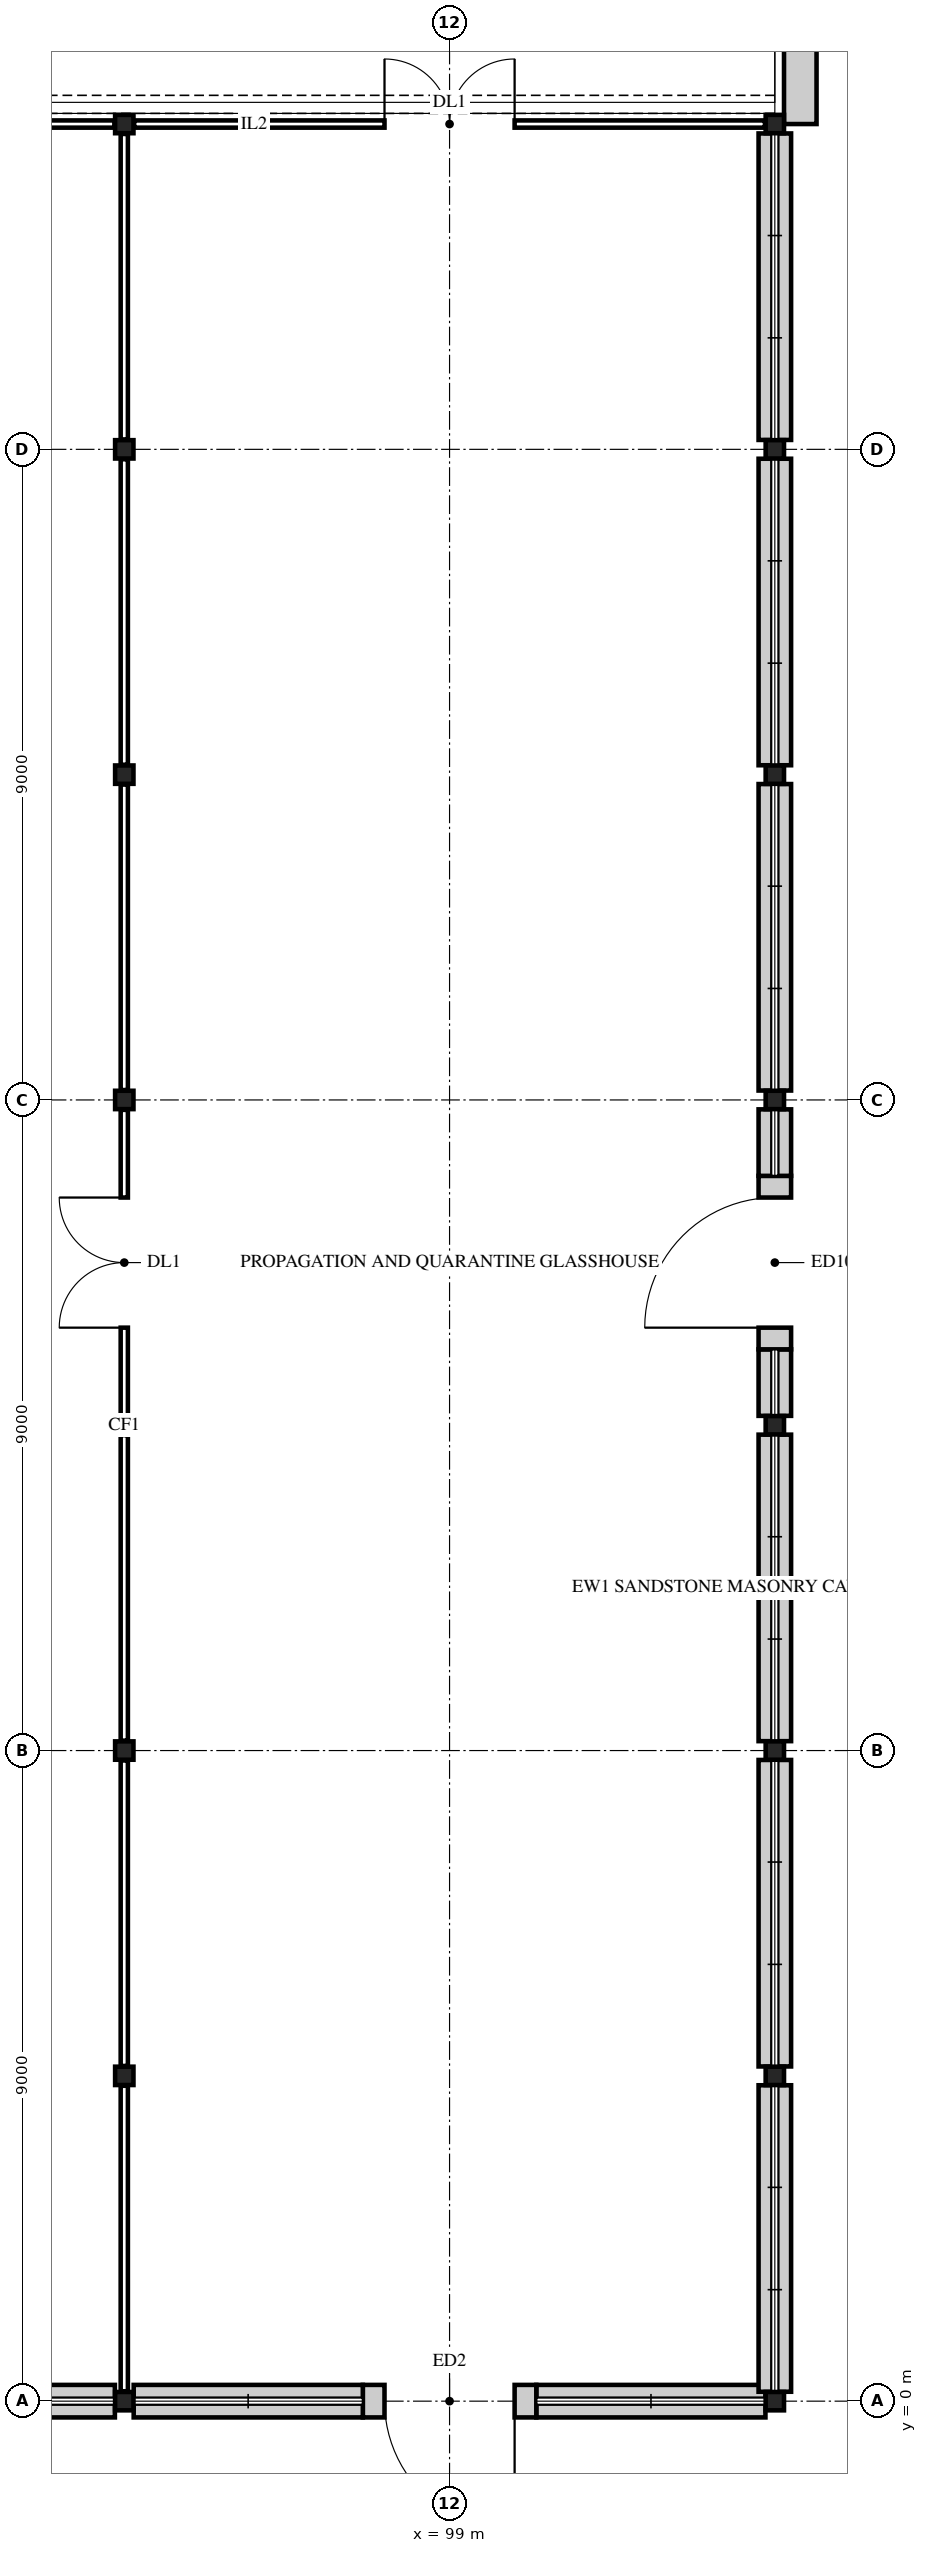
"""IFC4 building model, lengths in metres.
Left out: names, types, materials, properties, quantities, classifications, styles, units other than length and angle.
Written with IfcOpenShell. Run it as: python <this file> out.ifc"""

import sys

from ifc_helpers import new_model, si_unit, direction, frame, frame_2d, origin, origin_2d, place, context, subcontext, project, spatial, rectangle, i_section, extrude, element, fill, save


model = new_model("IFC4")
c1 = context("Model", 3, precision=1e-05, world=origin(), true_north=direction((0.0, 1.0)))
c2 = subcontext(c1, "Body", "Model", "MODEL_VIEW")
j1 = project(units=[si_unit("LENGTHUNIT", "METRE"), si_unit("PLANEANGLEUNIT", "RADIAN")], contexts=[c1])
p1 = place(None, origin())
s1 = spatial("IfcSite", under=j1, at=p1, CompositionType="ELEMENT")
p2 = place(p1, origin())
s2 = spatial("IfcBuilding", under=s1, at=p2, CompositionType="ELEMENT")
p3 = place(p2, origin())
s3 = spatial("IfcBuildingStorey", under=s2, at=p3, CompositionType="ELEMENT", Elevation=0.0)
for number, where, z_axis, x_axis in (
    (1, (94.5, 0.0, -0.2), (0.0, 0.0, 1.0), (1.0, 0.0, 0.0)),
    (2, (94.5, 4.5, -0.2), (0.0, 0.0, 1.0), (1.0, 0.0, 0.0)),
    (3, (94.5, 9.0, -0.2), (0.0, 0.0, 1.0), (1.0, 0.0, 0.0)),
    (4, (94.5, 13.5, -0.2), (0.0, 0.0, 1.0), (1.0, 0.0, 0.0)),
    (5, (94.5, 18.0, -0.2), (0.0, 0.0, 1.0), (1.0, 0.0, 0.0)),
    (6, (94.5, 22.5, -0.2), (0.0, 0.0, 1.0), (1.0, 0.0, 0.0)),
    (7, (94.5, 27.0, -0.2), (0.0, 0.0, 1.0), (1.0, 0.0, 0.0)),
    (8, (94.5, 31.5, -0.2), (0.0, 0.0, 1.0), (1.0, 0.0, 0.0)),
    (9, (103.5, 0.0, -0.2), (0.0, 0.0, 1.0), (1.0, 0.0, 0.0)),
    (10, (103.5, 4.5, -0.2), (0.0, 0.0, 1.0), (1.0, 0.0, 0.0)),
    (11, (103.5, 9.0, -0.2), (0.0, 0.0, 1.0), (1.0, 0.0, 0.0)),
    (12, (103.5, 13.5, -0.2), (0.0, 0.0, 1.0), (1.0, 0.0, 0.0)),
    (13, (103.5, 18.0, -0.2), (0.0, 0.0, 1.0), (1.0, 0.0, 0.0)),
    (14, (103.5, 22.5, -0.2), (0.0, 0.0, 1.0), (1.0, 0.0, 0.0)),
    (15, (103.5, 27.0, -0.2), (0.0, 0.0, 1.0), (1.0, 0.0, 0.0)),
    (16, (103.5, 31.5, -0.2), (0.0, 0.0, 1.0), (1.0, 0.0, 0.0)),
):
    element("IfcColumn", number, at=place(p3, frame(where, z_axis=z_axis, x_axis=x_axis)), inside=s3, PredefinedType="COLUMN", context=c2, shape_type="SweptSolid", body=[
        extrude(i_section(OverallWidth=0.254, OverallDepth=0.254, WebThickness=0.009, FlangeThickness=0.014, FilletRadius=0.014, at=origin_2d()), origin(), (0.0, 0.0, 1.0), 5.2),
    ])
for number, where, z_axis, x_axis in (
    (17, (94.37, 0.0, 0.0), (0.0, 0.0, 1.0), (-1.0, 0.0, 0.0)),
    (18, (103.37, 0.0, 0.0), (0.0, 0.0, 1.0), (-1.0, 0.0, 0.0)),
):
    element("IfcWall", number, at=place(p3, frame(where, z_axis=z_axis, x_axis=x_axis)), inside=s3, PredefinedType="STANDARD", context=c2, shape_type="SweptSolid", body=[
        extrude(rectangle(XDim=3.17, YDim=0.45, at=frame_2d((1.585, 0.0))), origin(), (0.0, 0.0, 1.0), 0.9),
    ])
p4 = place(p3, frame((100.2, 0.0, 0.0), z_axis=(0.0, 0.0, 1.0), x_axis=(-1.0, 0.0, 0.0)))
e19 = element("IfcWall", 19, at=p4, inside=s3, PredefinedType="STANDARD", context=c2, shape_type="SweptSolid", body=[
    extrude(rectangle(XDim=2.4, YDim=0.45, at=frame_2d((1.2, 0.0))), origin(), (0.0, 0.0, 1.0), 4.6),
])
p5 = place(p4, frame((0.3, 0.0, 0.012)))
e20 = element("IfcOpeningElement", 20, at=p5, cuts=e19, PredefinedType="OPENING", context=c2, shape_type="SweptSolid", body=[
    extrude(rectangle(XDim=1.8, YDim=2.4, at=frame_2d((0.9, 1.2))), frame((0.0, 0.235, 0.0), z_axis=(0.0, -1.0, 0.0), x_axis=(1.0, 0.0, 0.0)), (0.0, 0.0, 1.0), 0.47),
])
p6 = place(p3, frame((97.8, 0.0, 0.0), z_axis=(0.0, 0.0, 1.0), x_axis=(-1.0, 0.0, 0.0)))
e21 = element("IfcWall", 21, at=p6, inside=s3, PredefinedType="STANDARD", context=c2, shape_type="SweptSolid", body=[
    extrude(rectangle(XDim=3.17, YDim=0.45, at=frame_2d((1.585, 0.0))), origin(), (0.0, 0.0, 1.0), 0.9),
])
for number, where, z_axis, x_axis in (
    (22, (103.5, 0.13, 0.0), (0.0, 0.0, 1.0), (0.0, 1.0, 0.0)),
    (23, (103.5, 4.63, 0.0), (0.0, 0.0, 1.0), (0.0, 1.0, 0.0)),
    (24, (103.5, 9.13, 0.0), (0.0, 0.0, 1.0), (0.0, 1.0, 0.0)),
):
    element("IfcWall", number, at=place(p3, frame(where, z_axis=z_axis, x_axis=x_axis)), inside=s3, PredefinedType="STANDARD", context=c2, shape_type="SweptSolid", body=[
        extrude(rectangle(XDim=4.24, YDim=0.45, at=frame_2d((2.12, 0.0))), origin(), (0.0, 0.0, 1.0), 0.9),
    ])
p7 = place(p3, frame((103.5, 13.63, 0.0), z_axis=(0.0, 0.0, 1.0), x_axis=(0.0, 1.0, 0.0)))
e25 = element("IfcWall", 25, at=p7, inside=s3, PredefinedType="STANDARD", context=c2, shape_type="SweptSolid", body=[
    extrude(rectangle(XDim=0.92, YDim=0.45, at=frame_2d((0.46, 0.0))), origin(), (0.0, 0.0, 1.0), 0.9),
])
p8 = place(p3, frame((103.5, 14.55, 0.0), z_axis=(0.0, 0.0, 1.0), x_axis=(0.0, 1.0, 0.0)))
e26 = element("IfcWall", 26, at=p8, inside=s3, PredefinedType="STANDARD", context=c2, shape_type="SweptSolid", body=[
    extrude(rectangle(XDim=2.4, YDim=0.45, at=frame_2d((1.2, 0.0))), origin(), (0.0, 0.0, 1.0), 5.0),
])
p9 = place(p8, frame((0.3, 0.0, 0.012)))
e27 = element("IfcOpeningElement", 27, at=p9, cuts=e26, PredefinedType="OPENING", context=c2, shape_type="SweptSolid", body=[
    extrude(rectangle(XDim=1.8, YDim=2.4, at=frame_2d((0.9, 1.2))), frame((0.0, 0.235, 0.0), z_axis=(0.0, -1.0, 0.0), x_axis=(1.0, 0.0, 0.0)), (0.0, 0.0, 1.0), 0.47),
])
p10 = place(p3, frame((103.5, 16.95, 0.0), z_axis=(0.0, 0.0, 1.0), x_axis=(0.0, 1.0, 0.0)))
e28 = element("IfcWall", 28, at=p10, inside=s3, PredefinedType="STANDARD", context=c2, shape_type="SweptSolid", body=[
    extrude(rectangle(XDim=0.92, YDim=0.45, at=frame_2d((0.46, 0.0))), origin(), (0.0, 0.0, 1.0), 0.9),
])
for number, where, z_axis, x_axis in (
    (29, (103.5, 18.13, 0.0), (0.0, 0.0, 1.0), (0.0, 1.0, 0.0)),
    (30, (103.5, 22.63, 0.0), (0.0, 0.0, 1.0), (0.0, 1.0, 0.0)),
    (31, (103.5, 27.13, 0.0), (0.0, 0.0, 1.0), (0.0, 1.0, 0.0)),
):
    element("IfcWall", number, at=place(p3, frame(where, z_axis=z_axis, x_axis=x_axis)), inside=s3, PredefinedType="STANDARD", context=c2, shape_type="SweptSolid", body=[
        extrude(rectangle(XDim=4.24, YDim=0.45, at=frame_2d((2.12, 0.0))), origin(), (0.0, 0.0, 1.0), 0.9),
    ])
p11 = place(p3, frame((103.852, 36.0, 0.0), z_axis=(0.0, 0.0, 1.0), x_axis=(0.0, -1.0, 0.0)))
e32 = element("IfcWall", 32, at=p11, inside=s3, PredefinedType="STANDARD", context=c2, shape_type="SweptSolid", body=[
    extrude(rectangle(XDim=4.5, YDim=0.45, at=frame_2d((2.25, 0.0))), origin(), (0.0, 0.0, 1.0), 4.5),
])
p12 = place(p11, frame((1.35, 0.0, 0.012)))
e33 = element("IfcOpeningElement", 33, at=p12, cuts=e32, PredefinedType="OPENING", context=c2, shape_type="SweptSolid", body=[
    extrude(rectangle(XDim=1.8, YDim=2.4, at=frame_2d((0.9, 1.2))), frame((0.0, 0.235, 0.0), z_axis=(0.0, -1.0, 0.0), x_axis=(1.0, 0.0, 0.0)), (0.0, 0.0, 1.0), 0.47),
])
p13 = place(p3, frame((103.5, 31.772, 4.5), z_axis=(0.0, 0.0, 1.0), x_axis=(-1.0, 0.0, 0.0)))
e34 = element("IfcWall", 34, at=p13, inside=s3, PredefinedType="PARAPET", context=c2, shape_type="SweptSolid", body=[
    extrude(rectangle(XDim=27.0, YDim=0.25, at=frame_2d((13.5, 0.0))), origin(), (0.0, 0.0, 1.0), 1.1),
])
for number, where, z_axis, x_axis in (
    (35, (94.5, 0.137, 0.0), (0.0, 0.0, 1.0), (0.0, 1.0, 0.0)),
    (36, (94.5, 4.637, 0.0), (0.0, 0.0, 1.0), (0.0, 1.0, 0.0)),
    (37, (94.5, 9.137, 0.0), (0.0, 0.0, 1.0), (0.0, 1.0, 0.0)),
):
    element("IfcWall", number, at=place(p3, frame(where, z_axis=z_axis, x_axis=x_axis)), inside=s3, PredefinedType="PARTITIONING", context=c2, shape_type="SweptSolid", body=[
        extrude(rectangle(XDim=4.226, YDim=0.1, at=frame_2d((2.113, 0.0))), origin(), (0.0, 0.0, 1.0), 5.0),
    ])
p14 = place(p3, frame((94.5, 13.637, 0.0), z_axis=(0.0, 0.0, 1.0), x_axis=(0.0, 1.0, 0.0)))
e38 = element("IfcWall", 38, at=p14, inside=s3, PredefinedType="PARTITIONING", context=c2, shape_type="SweptSolid", body=[
    extrude(rectangle(XDim=4.226, YDim=0.1, at=frame_2d((2.113, 0.0))), origin(), (0.0, 0.0, 1.0), 5.0),
])
p15 = place(p14, frame((1.213, 0.0, 0.0)))
e39 = element("IfcOpeningElement", 39, at=p15, cuts=e38, PredefinedType="OPENING", context=c2, shape_type="SweptSolid", body=[
    extrude(rectangle(XDim=1.8, YDim=2.1, at=frame_2d((0.9, 1.05))), frame((0.0, 0.06, 0.0), z_axis=(0.0, -1.0, 0.0), x_axis=(1.0, 0.0, 0.0)), (0.0, 0.0, 1.0), 0.12),
])
for number, where, z_axis, x_axis in (
    (40, (94.5, 18.137, 0.0), (0.0, 0.0, 1.0), (0.0, 1.0, 0.0)),
    (41, (94.5, 22.637, 0.0), (0.0, 0.0, 1.0), (0.0, 1.0, 0.0)),
    (42, (94.5, 27.137, 0.0), (0.0, 0.0, 1.0), (0.0, 1.0, 0.0)),
):
    element("IfcWall", number, at=place(p3, frame(where, z_axis=z_axis, x_axis=x_axis)), inside=s3, PredefinedType="PARTITIONING", context=c2, shape_type="SweptSolid", body=[
        extrude(rectangle(XDim=4.226, YDim=0.1, at=frame_2d((2.113, 0.0))), origin(), (0.0, 0.0, 1.0), 5.0),
    ])
p16 = place(p3, frame((90.01, 31.5, 0.0), z_axis=(0.0, 0.0, 1.0), x_axis=(1.0, 0.0, 0.0)))
e43 = element("IfcWall", 43, at=p16, inside=s3, PredefinedType="PARTITIONING", context=c2, shape_type="SweptSolid", body=[
    extrude(rectangle(XDim=4.353, YDim=0.1, at=frame_2d((2.177, 0.0))), origin(), (0.0, 0.0, 1.0), 4.046),
])
p17 = place(p3, frame((94.637, 31.5, 0.0), z_axis=(0.0, 0.0, 1.0), x_axis=(1.0, 0.0, 0.0)))
e44 = element("IfcWall", 44, at=p17, inside=s3, PredefinedType="PARTITIONING", context=c2, shape_type="SweptSolid", body=[
    extrude(rectangle(XDim=8.726, YDim=0.1, at=frame_2d((4.363, 0.0))), origin(), (0.0, 0.0, 1.0), 4.046),
])
p18 = place(p17, frame((3.463, 0.0, 0.0)))
e45 = element("IfcOpeningElement", 45, at=p18, cuts=e44, PredefinedType="OPENING", context=c2, shape_type="SweptSolid", body=[
    extrude(rectangle(XDim=1.8, YDim=2.1, at=frame_2d((0.9, 1.05))), frame((0.0, 0.06, 0.0), z_axis=(0.0, -1.0, 0.0), x_axis=(1.0, 0.0, 0.0)), (0.0, 0.0, 1.0), 0.12),
])
p19 = place(p5, origin())
e46 = element("IfcDoor", 46, at=p19, inside=s3, OperationType="DOUBLE_DOOR_DOUBLE_SWING", PredefinedType="DOOR", context=c2, shape_type="SweptSolid", body=[
    extrude(rectangle(XDim=1.8, YDim=2.4, at=frame_2d((0.9, 1.2))), frame((0.0, 0.025, 0.0), z_axis=(0.0, -1.0, 0.0), x_axis=(1.0, 0.0, 0.0)), (0.0, 0.0, 1.0), 0.05),
])
fill(e20, e46)
p20 = place(p9, origin())
e47 = element("IfcDoor", 47, at=p20, inside=s3, OperationType="DOUBLE_DOOR_DOUBLE_SWING", PredefinedType="DOOR", context=c2, shape_type="SweptSolid", body=[
    extrude(rectangle(XDim=1.8, YDim=2.4, at=frame_2d((0.9, 1.2))), frame((0.0, 0.025, 0.0), z_axis=(0.0, -1.0, 0.0), x_axis=(1.0, 0.0, 0.0)), (0.0, 0.0, 1.0), 0.05),
])
fill(e27, e47)
p21 = place(p15, frame((1.8, 0.0, 0.0), z_axis=(0.0, 0.0, 1.0), x_axis=(-1.0, 0.0, 0.0)))
e48 = element("IfcDoor", 48, at=p21, inside=s3, OperationType="DOUBLE_DOOR_SINGLE_SWING", PredefinedType="DOOR", context=c2, shape_type="SweptSolid", body=[
    extrude(rectangle(XDim=1.8, YDim=2.1, at=frame_2d((0.9, 1.05))), frame((0.0, 0.025, 0.0), z_axis=(0.0, -1.0, 0.0), x_axis=(1.0, 0.0, 0.0)), (0.0, 0.0, 1.0), 0.05),
])
fill(e39, e48)
p22 = place(p18, origin())
e49 = element("IfcDoor", 49, at=p22, inside=s3, OperationType="DOUBLE_DOOR_SINGLE_SWING", PredefinedType="DOOR", context=c2, shape_type="SweptSolid", body=[
    extrude(rectangle(XDim=1.8, YDim=2.1, at=frame_2d((0.9, 1.05))), frame((0.0, 0.025, 0.0), z_axis=(0.0, -1.0, 0.0), x_axis=(1.0, 0.0, 0.0)), (0.0, 0.0, 1.0), 0.05),
])
fill(e45, e49)
save(model, sys.argv[1])
